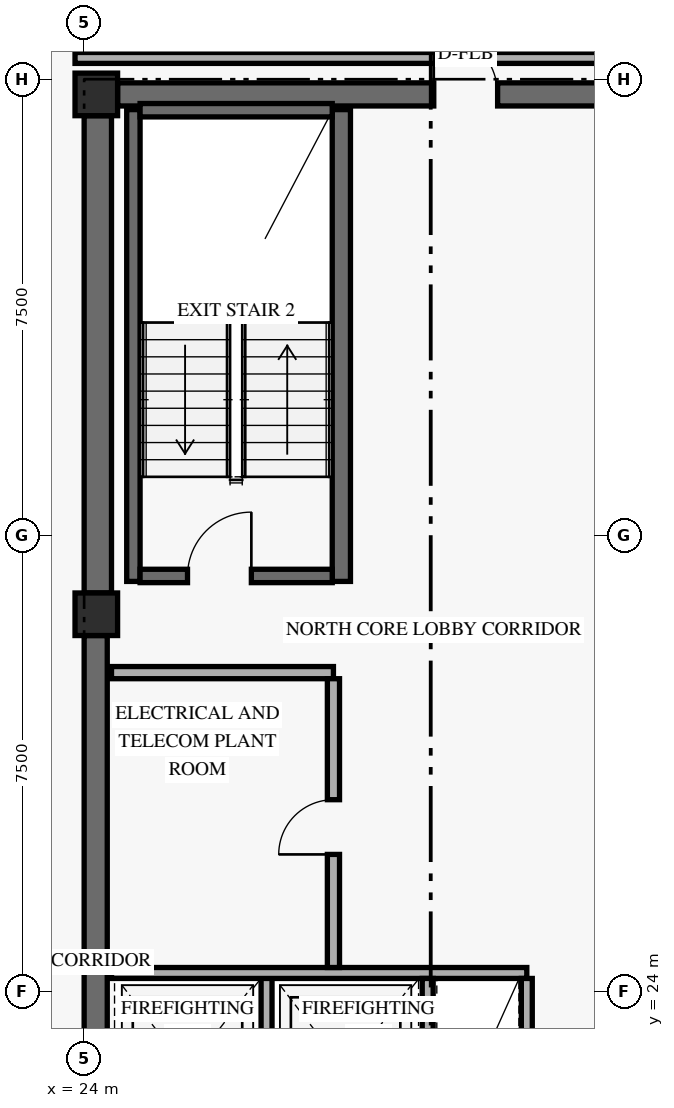
"""IFC4 building model, lengths in metres.
Left out: names, types, materials, properties, quantities, classifications, styles, units other than length and angle.
Written with IfcOpenShell. Run it as: python <this file> out.ifc"""

import sys

from ifc_helpers import new_model, si_unit, direction, frame, frame_2d, origin, origin_2d, place, context, subcontext, project, spatial, rectangle, extrude, element, fill, save


model = new_model("IFC4")
c1 = context("Model", 3, precision=1e-05, world=origin(), true_north=direction((0.0, 1.0)))
c2 = subcontext(c1, "Body", "Model", "MODEL_VIEW")
j1 = project(units=[si_unit("LENGTHUNIT", "METRE"), si_unit("PLANEANGLEUNIT", "RADIAN")], contexts=[c1])
p1 = place(None, origin())
s1 = spatial("IfcSite", under=j1, at=p1, CompositionType="ELEMENT")
p2 = place(p1, origin())
s2 = spatial("IfcBuilding", under=s1, at=p2, CompositionType="ELEMENT")
p3 = place(p2, frame((0.0, 0.0, 166.2)))
s3 = spatial("IfcBuildingStorey", under=s2, at=p3, CompositionType="ELEMENT", Elevation=166.2)
p4 = place(p3, frame((24.19, 17.9, 0.0), z_axis=(0.0, 0.0, 1.0), x_axis=(0.0, 1.0, 0.0)))
e1 = element("IfcWall", 1, at=p4, inside=s3, PredefinedType="SHEAR", context=c2, shape_type="SweptSolid", body=[
    extrude(rectangle(XDim=11.95, YDim=0.38, at=frame_2d((5.975, 0.0))), origin(), (0.0, 0.0, 1.0), 2.748),
])
p5 = place(p3, frame((24.225, 30.55, 0.0), z_axis=(0.0, 0.0, 1.0), x_axis=(0.0, 1.0, 0.0)))
e2 = element("IfcWall", 2, at=p5, inside=s3, PredefinedType="SHEAR", context=c2, shape_type="SweptSolid", body=[
    extrude(rectangle(XDim=7.85, YDim=0.45, at=frame_2d((3.925, 0.0))), origin(), (0.0, 0.0, 1.0), 2.748),
])
p6 = place(p3, frame((24.55, 38.75, 0.0), z_axis=(0.0, 0.0, 1.0), x_axis=(1.0, 0.0, 0.0)))
e3 = element("IfcWall", 3, at=p6, inside=s3, PredefinedType="SHEAR", context=c2, shape_type="SweptSolid", body=[
    extrude(rectangle(XDim=10.3, YDim=0.38, at=frame_2d((5.15, 0.0))), origin(), (0.0, 0.0, 1.0), 3.36),
])
p7 = place(p6, frame((5.2, 0.0, 0.0)))
e4 = element("IfcOpeningElement", 4, at=p7, cuts=e3, PredefinedType="OPENING", context=c2, shape_type="SweptSolid", body=[
    extrude(rectangle(XDim=1.05, YDim=2.15, at=frame_2d((0.525, 1.075))), frame((0.0, 0.2, 0.0), z_axis=(0.0, -1.0, 0.0), x_axis=(1.0, 0.0, 0.0)), (0.0, 0.0, 1.0), 0.4),
])
p8 = place(p3, frame((24.81, 30.74, 0.0), z_axis=(0.0, 0.0, 1.0), x_axis=(0.0, 1.0, 0.0)))
e5 = element("IfcWall", 5, at=p8, inside=s3, PredefinedType="SHEAR", context=c2, shape_type="SweptSolid", body=[
    extrude(rectangle(XDim=7.76, YDim=0.22, at=frame_2d((3.88, 0.0))), origin(), (0.0, 0.0, 1.0), 3.36),
])
p9 = place(p3, frame((28.23, 30.74, 0.0), z_axis=(0.0, 0.0, 1.0), x_axis=(0.0, 1.0, 0.0)))
e6 = element("IfcWall", 6, at=p9, inside=s3, PredefinedType="SHEAR", context=c2, shape_type="SweptSolid", body=[
    extrude(rectangle(XDim=7.76, YDim=0.3, at=frame_2d((3.88, 0.0))), origin(), (0.0, 0.0, 1.0), 3.36),
])
p10 = place(p3, frame((24.92, 30.83, 0.0), z_axis=(0.0, 0.0, 1.0), x_axis=(1.0, 0.0, 0.0)))
e7 = element("IfcWall", 7, at=p10, inside=s3, PredefinedType="SHEAR", context=c2, shape_type="SweptSolid", body=[
    extrude(rectangle(XDim=3.16, YDim=0.22, at=frame_2d((1.58, 0.0))), origin(), (0.0, 0.0, 1.0), 3.36),
])
p11 = place(p10, frame((0.78, 0.0, 0.0)))
e8 = element("IfcOpeningElement", 8, at=p11, cuts=e7, PredefinedType="OPENING", context=c2, shape_type="SweptSolid", body=[
    extrude(rectangle(XDim=1.05, YDim=2.15, at=frame_2d((0.525, 1.075))), frame((0.0, 0.12, 0.0), z_axis=(0.0, -1.0, 0.0), x_axis=(1.0, 0.0, 0.0)), (0.0, 0.0, 1.0), 0.24),
])
p12 = place(p3, frame((24.92, 38.49, 0.0), z_axis=(0.0, 0.0, 1.0), x_axis=(1.0, 0.0, 0.0)))
e9 = element("IfcWall", 9, at=p12, inside=s3, PredefinedType="SHEAR", context=c2, shape_type="SweptSolid", body=[
    extrude(rectangle(XDim=3.16, YDim=0.22, at=frame_2d((1.58, 0.0))), origin(), (0.0, 0.0, 1.0), 3.36),
])
for number, where, z_axis, x_axis in (
    (10, (24.2, 30.2, 0.0), (0.0, 0.0, 1.0), (1.0, 0.0, 0.0)),
    (11, (24.2, 38.75, 0.0), (0.0, 0.0, 1.0), (1.0, 0.0, 0.0)),
):
    element("IfcColumn", number, at=place(p3, frame(where, z_axis=z_axis, x_axis=x_axis)), inside=s3, PredefinedType="COLUMN", context=c2, shape_type="SweptSolid", body=[
        extrude(rectangle(XDim=0.7, YDim=0.7, at=origin_2d()), origin(), (0.0, 0.0, 1.0), 3.6),
    ])
p13 = place(p3, frame((27.0, 21.19, 0.0), z_axis=(0.0, 0.0, 1.0), x_axis=(0.0, 1.0, 0.0)))
e12 = element("IfcWall", 12, at=p13, inside=s3, PredefinedType="STANDARD", context=c2, shape_type="SweptSolid", body=[
    extrude(rectangle(XDim=3.11, YDim=0.18, at=frame_2d((1.555, 0.0))), origin(), (0.0, 0.0, 1.0), 3.36),
])
p14 = place(p3, frame((24.45, 24.3, 0.0), z_axis=(0.0, 0.0, 1.0), x_axis=(1.0, 0.0, 0.0)))
e13 = element("IfcWall", 13, at=p14, inside=s3, PredefinedType="STANDARD", context=c2, shape_type="SweptSolid", body=[
    extrude(rectangle(XDim=6.83, YDim=0.18, at=frame_2d((3.415, 0.0))), origin(), (0.0, 0.0, 1.0), 3.36),
])
for number, where, z_axis, x_axis in (
    (14, (29.65, 21.19, 0.0), (0.0, 0.0, 1.0), (0.0, 1.0, 0.0)),
    (15, (31.28, 21.19, 0.0), (0.0, 0.0, 1.0), (0.0, 1.0, 0.0)),
):
    element("IfcWall", number, at=place(p3, frame(where, z_axis=z_axis, x_axis=x_axis)), inside=s3, PredefinedType="STANDARD", context=c2, shape_type="SweptSolid", body=[
        extrude(rectangle(XDim=3.02, YDim=0.18, at=frame_2d((1.51, 0.0))), origin(), (0.0, 0.0, 1.0), 3.36),
    ])
p15 = place(p3, frame((24.45, 29.24, 0.0), z_axis=(0.0, 0.0, 1.0), x_axis=(1.0, 0.0, 0.0)))
e16 = element("IfcWall", 16, at=p15, inside=s3, PredefinedType="STANDARD", context=c2, shape_type="SweptSolid", body=[
    extrude(rectangle(XDim=3.65, YDim=0.2, at=frame_2d((1.825, 0.0))), origin(), (0.0, 0.0, 1.0), 3.36),
])
p16 = place(p3, frame((28.1, 24.39, 0.0), z_axis=(0.0, 0.0, 1.0), x_axis=(0.0, 1.0, 0.0)))
e17 = element("IfcWall", 17, at=p16, inside=s3, PredefinedType="STANDARD", context=c2, shape_type="SweptSolid", body=[
    extrude(rectangle(XDim=4.75, YDim=0.2, at=frame_2d((2.375, 0.0))), origin(), (0.0, 0.0, 1.0), 3.36),
])
p17 = place(p16, frame((1.86, 0.0, 0.0)))
e18 = element("IfcOpeningElement", 18, at=p17, cuts=e17, PredefinedType="OPENING", context=c2, shape_type="SweptSolid", body=[
    extrude(rectangle(XDim=0.9, YDim=2.1, at=frame_2d((0.45, 1.05))), frame((0.0, 0.11, 0.0), z_axis=(0.0, -1.0, 0.0), x_axis=(1.0, 0.0, 0.0)), (0.0, 0.0, 1.0), 0.22),
])
p18 = place(p3, frame((23.85, 39.35, 0.0), z_axis=(0.0, 0.0, 1.0), x_axis=(1.0, 0.0, 0.0)))
e19 = element("IfcWall", 19, at=p18, inside=s3, PredefinedType="STANDARD", context=c2, shape_type="SweptSolid", body=[
    extrude(rectangle(XDim=11.57, YDim=0.18, at=frame_2d((5.785, 0.0))), origin(), (0.0, 0.0, 1.0), 2.73),
])
p19 = place(p11, origin())
e20 = element("IfcDoor", 20, at=p19, inside=s3, OperationType="SINGLE_SWING_RIGHT", PredefinedType="DOOR", context=c2, shape_type="SweptSolid", body=[
    extrude(rectangle(XDim=1.05, YDim=2.15, at=frame_2d((0.525, 1.075))), frame((0.0, 0.025, 0.0), z_axis=(0.0, -1.0, 0.0), x_axis=(1.0, 0.0, 0.0)), (0.0, 0.0, 1.0), 0.05),
])
fill(e8, e20)
p20 = place(p17, origin())
e21 = element("IfcDoor", 21, at=p20, inside=s3, OperationType="SINGLE_SWING_LEFT", PredefinedType="DOOR", context=c2, shape_type="SweptSolid", body=[
    extrude(rectangle(XDim=0.9, YDim=2.1, at=frame_2d((0.45, 1.05))), frame((0.0, 0.025, 0.0), z_axis=(0.0, -1.0, 0.0), x_axis=(1.0, 0.0, 0.0)), (0.0, 0.0, 1.0), 0.05),
])
fill(e18, e21)
p21 = place(p7, frame((1.05, 0.0, 0.0), z_axis=(0.0, 0.0, 1.0), x_axis=(-1.0, 0.0, 0.0)))
e22 = element("IfcDoor", 22, at=p21, inside=s3, OperationType="SINGLE_SWING_RIGHT", PredefinedType="DOOR", context=c2, shape_type="SweptSolid", body=[
    extrude(rectangle(XDim=1.05, YDim=2.15, at=frame_2d((0.525, 1.075))), frame((0.0, 0.025, 0.0), z_axis=(0.0, -1.0, 0.0), x_axis=(1.0, 0.0, 0.0)), (0.0, 0.0, 1.0), 0.05),
])
fill(e4, e22)
save(model, sys.argv[1])
